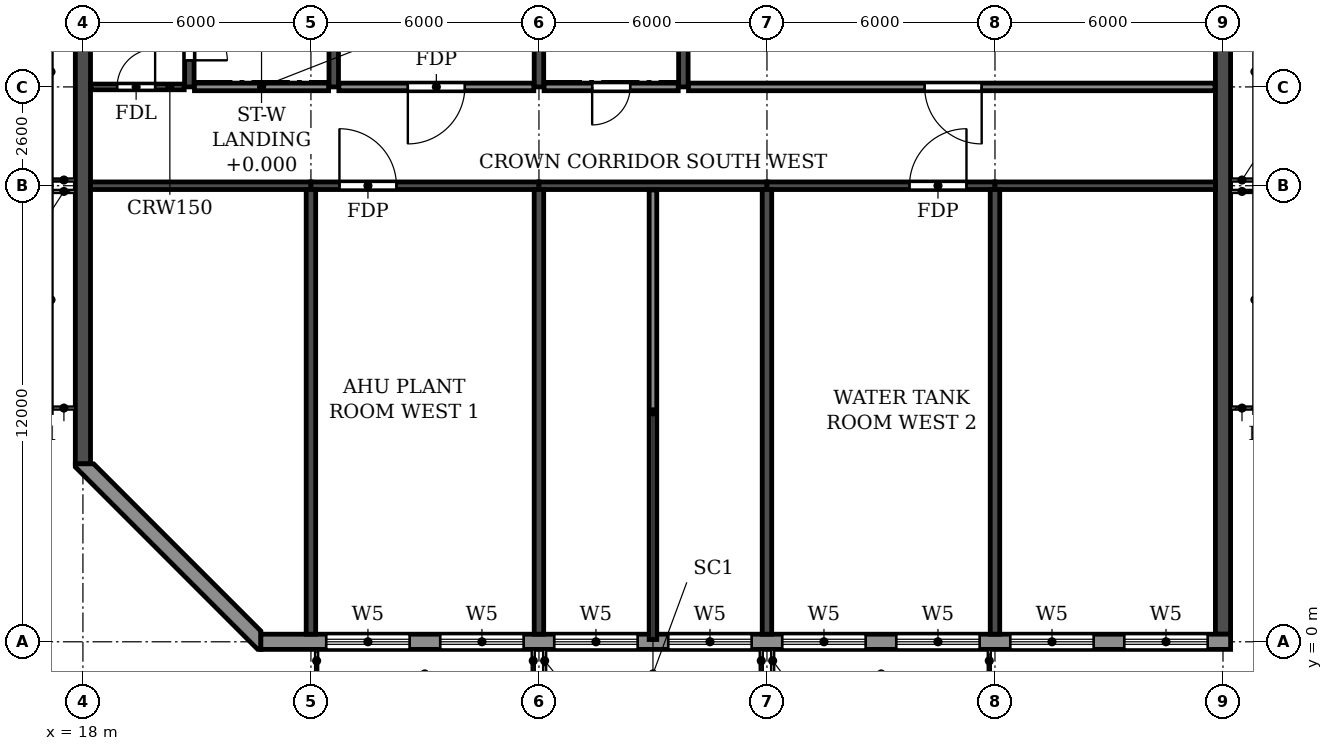
"""IFC4 building model, lengths in metres.
Left out: names, types, materials, properties, quantities, classifications, styles, units other than length and angle.
Written with IfcOpenShell. Run it as: python <this file> out.ifc"""

import sys

from ifc_helpers import new_model, si_unit, direction, frame, frame_2d, origin, place, context, subcontext, project, spatial, polyline, rectangle, outline, extrude, element, fill, save


model = new_model("IFC4")
c1 = context("Model", 3, precision=1e-05, world=origin(), true_north=direction((0.0, 1.0)))
c2 = subcontext(c1, "Body", "Model", "MODEL_VIEW")
j1 = project(units=[si_unit("LENGTHUNIT", "METRE"), si_unit("PLANEANGLEUNIT", "RADIAN")], contexts=[c1])
p1 = place(None, origin())
s1 = spatial("IfcSite", under=j1, at=p1, CompositionType="ELEMENT")
p2 = place(p1, origin())
s2 = spatial("IfcBuilding", under=s1, at=p2, CompositionType="ELEMENT")
p3 = place(p2, frame((0.0, 0.0, 275.7)))
s3 = spatial("IfcBuildingStorey", under=s2, at=p3, CompositionType="ELEMENT", Elevation=275.7)
for number, where, z_axis, x_axis in (
    (1, (24.0, 0.2, 0.0), (0.0, 0.0, 1.0), (0.0, 1.0, 0.0)),
    (2, (30.0, 0.2, 0.0), (0.0, 0.0, 1.0), (0.0, 1.0, 0.0)),
    (3, (36.0, 0.2, 0.0), (0.0, 0.0, 1.0), (0.0, 1.0, 0.0)),
    (4, (42.0, 0.2, 0.0), (0.0, 0.0, 1.0), (0.0, 1.0, 0.0)),
):
    element("IfcWall", number, at=place(p3, frame(where, z_axis=z_axis, x_axis=x_axis)), inside=s3, PredefinedType="SHEAR", context=c2, shape_type="SweptSolid", body=[
        extrude(rectangle(XDim=11.7, YDim=0.25, at=frame_2d((5.85, 0.0))), origin(), (0.0, 0.0, 1.0), 3.05),
    ])
p4 = place(p3, frame((18.0, 4.683, 0.0), z_axis=(0.0, 0.0, 1.0), x_axis=(0.0, 1.0, 0.0)))
e5 = element("IfcWall", 5, at=p4, inside=s3, PredefinedType="SHEAR", context=c2, shape_type="SweptSolid", body=[
    extrude(rectangle(XDim=31.834, YDim=0.4, at=frame_2d((15.917, 0.0))), origin(), (0.0, 0.0, 1.0), 3.05),
])
p5 = place(p3, frame((48.0, 0.2, 0.0), z_axis=(0.0, 0.0, 1.0), x_axis=(0.0, 1.0, 0.0)))
e6 = element("IfcWall", 6, at=p5, inside=s3, PredefinedType="SHEAR", context=c2, shape_type="SweptSolid", body=[
    extrude(rectangle(XDim=40.8, YDim=0.4, at=frame_2d((20.4, 0.0))), origin(), (0.0, 0.0, 1.0), 3.05),
])
p6 = place(p3, frame((18.2, 12.0, 0.0), z_axis=(0.0, 0.0, 1.0), x_axis=(1.0, 0.0, 0.0)))
e7 = element("IfcWall", 7, at=p6, inside=s3, PredefinedType="SHEAR", context=c2, shape_type="SweptSolid", body=[
    extrude(rectangle(XDim=5.8, YDim=0.2, at=frame_2d((2.9, 0.0))), origin(), (0.0, 0.0, 1.0), 2.45),
])
p7 = place(p3, frame((24.0, 12.0, 0.0), z_axis=(0.0, 0.0, 1.0), x_axis=(1.0, 0.0, 0.0)))
e8 = element("IfcWall", 8, at=p7, inside=s3, PredefinedType="SHEAR", context=c2, shape_type="SweptSolid", body=[
    extrude(rectangle(XDim=6.0, YDim=0.2, at=frame_2d((3.0, 0.0))), origin(), (0.0, 0.0, 1.0), 2.45),
])
p8 = place(p7, frame((0.75, 0.0, 0.0)))
e9 = element("IfcOpeningElement", 9, at=p8, cuts=e8, PredefinedType="OPENING", context=c2, shape_type="SweptSolid", body=[
    extrude(rectangle(XDim=1.5, YDim=2.1, at=frame_2d((0.75, 1.05))), frame((0.0, 0.11, 0.0), z_axis=(0.0, -1.0, 0.0), x_axis=(1.0, 0.0, 0.0)), (0.0, 0.0, 1.0), 0.22),
])
p9 = place(p3, frame((30.0, 12.0, 0.0), z_axis=(0.0, 0.0, 1.0), x_axis=(1.0, 0.0, 0.0)))
e10 = element("IfcWall", 10, at=p9, inside=s3, PredefinedType="SHEAR", context=c2, shape_type="SweptSolid", body=[
    extrude(rectangle(XDim=6.0, YDim=0.2, at=frame_2d((3.0, 0.0))), origin(), (0.0, 0.0, 1.0), 2.45),
])
p10 = place(p3, frame((36.0, 12.0, 0.0), z_axis=(0.0, 0.0, 1.0), x_axis=(1.0, 0.0, 0.0)))
e11 = element("IfcWall", 11, at=p10, inside=s3, PredefinedType="SHEAR", context=c2, shape_type="SweptSolid", body=[
    extrude(rectangle(XDim=6.0, YDim=0.2, at=frame_2d((3.0, 0.0))), origin(), (0.0, 0.0, 1.0), 2.45),
])
p11 = place(p10, frame((3.75, 0.0, 0.0)))
e12 = element("IfcOpeningElement", 12, at=p11, cuts=e11, PredefinedType="OPENING", context=c2, shape_type="SweptSolid", body=[
    extrude(rectangle(XDim=1.5, YDim=2.1, at=frame_2d((0.75, 1.05))), frame((0.0, 0.11, 0.0), z_axis=(0.0, -1.0, 0.0), x_axis=(1.0, 0.0, 0.0)), (0.0, 0.0, 1.0), 0.22),
])
p12 = place(p3, frame((42.0, 12.0, 0.0), z_axis=(0.0, 0.0, 1.0), x_axis=(1.0, 0.0, 0.0)))
e13 = element("IfcWall", 13, at=p12, inside=s3, PredefinedType="SHEAR", context=c2, shape_type="SweptSolid", body=[
    extrude(rectangle(XDim=5.8, YDim=0.2, at=frame_2d((2.9, 0.0))), origin(), (0.0, 0.0, 1.0), 2.45),
])
p13 = place(p3, frame((20.8, 14.6, 0.0), z_axis=(0.0, 0.0, 1.0), x_axis=(0.0, 1.0, 0.0)))
e14 = element("IfcWall", 14, at=p13, inside=s3, PredefinedType="SOLIDWALL", context=c2, shape_type="SweptSolid", body=[
    extrude(rectangle(XDim=7.875, YDim=0.25, at=frame_2d((3.938, 0.0))), origin(), (0.0, 0.0, 1.0), 3.05),
])
p14 = place(p13, frame((0.7, 0.0, 0.0)))
e15 = element("IfcOpeningElement", 15, at=p14, cuts=e14, PredefinedType="OPENING", context=c2, shape_type="SweptSolid", body=[
    extrude(rectangle(XDim=1.0, YDim=2.1, at=frame_2d((0.5, 1.05))), frame((0.0, 0.135, 0.0), z_axis=(0.0, -1.0, 0.0), x_axis=(1.0, 0.0, 0.0)), (0.0, 0.0, 1.0), 0.27),
])
for number, where, z_axis, x_axis in (
    (16, (24.6, 14.6, 0.0), (0.0, 0.0, 1.0), (0.0, 1.0, 0.0)),
    (17, (30.0, 14.6, 0.0), (0.0, 0.0, 1.0), (0.0, 1.0, 0.0)),
    (18, (33.8, 14.6, 0.0), (0.0, 0.0, 1.0), (0.0, 1.0, 0.0)),
):
    element("IfcWall", number, at=place(p3, frame(where, z_axis=z_axis, x_axis=x_axis)), inside=s3, PredefinedType="SOLIDWALL", context=c2, shape_type="SweptSolid", body=[
        extrude(rectangle(XDim=7.875, YDim=0.25, at=frame_2d((3.938, 0.0))), origin(), (0.0, 0.0, 1.0), 3.05),
    ])
p15 = place(p3, frame((22.683, 0.0, 0.0), z_axis=(0.0, 0.0, 1.0), x_axis=(1.0, 0.0, 0.0)))
e19 = element("IfcWall", 19, at=p15, inside=s3, PredefinedType="STANDARD", context=c2, shape_type="SweptSolid", body=[
    extrude(rectangle(XDim=25.517, YDim=0.4, at=frame_2d((12.759, 0.0))), origin(), (0.0, 0.0, 1.0), 3.05),
])
p16 = place(p15, frame((1.717, 0.0, 0.6)))
e20 = element("IfcOpeningElement", 20, at=p16, cuts=e19, PredefinedType="OPENING", context=c2, shape_type="SweptSolid", body=[
    extrude(rectangle(XDim=2.2, YDim=2.4, at=frame_2d((1.1, 1.2))), frame((0.0, 0.21, 0.0), z_axis=(0.0, -1.0, 0.0), x_axis=(1.0, 0.0, 0.0)), (0.0, 0.0, 1.0), 0.42),
])
p17 = place(p15, frame((4.717, 0.0, 0.6)))
e21 = element("IfcOpeningElement", 21, at=p17, cuts=e19, PredefinedType="OPENING", context=c2, shape_type="SweptSolid", body=[
    extrude(rectangle(XDim=2.2, YDim=2.4, at=frame_2d((1.1, 1.2))), frame((0.0, 0.21, 0.0), z_axis=(0.0, -1.0, 0.0), x_axis=(1.0, 0.0, 0.0)), (0.0, 0.0, 1.0), 0.42),
])
p18 = place(p15, frame((7.717, 0.0, 0.6)))
e22 = element("IfcOpeningElement", 22, at=p18, cuts=e19, PredefinedType="OPENING", context=c2, shape_type="SweptSolid", body=[
    extrude(rectangle(XDim=2.2, YDim=2.4, at=frame_2d((1.1, 1.2))), frame((0.0, 0.21, 0.0), z_axis=(0.0, -1.0, 0.0), x_axis=(1.0, 0.0, 0.0)), (0.0, 0.0, 1.0), 0.42),
])
p19 = place(p15, frame((10.717, 0.0, 0.6)))
e23 = element("IfcOpeningElement", 23, at=p19, cuts=e19, PredefinedType="OPENING", context=c2, shape_type="SweptSolid", body=[
    extrude(rectangle(XDim=2.2, YDim=2.4, at=frame_2d((1.1, 1.2))), frame((0.0, 0.21, 0.0), z_axis=(0.0, -1.0, 0.0), x_axis=(1.0, 0.0, 0.0)), (0.0, 0.0, 1.0), 0.42),
])
p20 = place(p15, frame((13.717, 0.0, 0.6)))
e24 = element("IfcOpeningElement", 24, at=p20, cuts=e19, PredefinedType="OPENING", context=c2, shape_type="SweptSolid", body=[
    extrude(rectangle(XDim=2.2, YDim=2.4, at=frame_2d((1.1, 1.2))), frame((0.0, 0.21, 0.0), z_axis=(0.0, -1.0, 0.0), x_axis=(1.0, 0.0, 0.0)), (0.0, 0.0, 1.0), 0.42),
])
p21 = place(p15, frame((16.717, 0.0, 0.6)))
e25 = element("IfcOpeningElement", 25, at=p21, cuts=e19, PredefinedType="OPENING", context=c2, shape_type="SweptSolid", body=[
    extrude(rectangle(XDim=2.2, YDim=2.4, at=frame_2d((1.1, 1.2))), frame((0.0, 0.21, 0.0), z_axis=(0.0, -1.0, 0.0), x_axis=(1.0, 0.0, 0.0)), (0.0, 0.0, 1.0), 0.42),
])
p22 = place(p15, frame((19.717, 0.0, 0.6)))
e26 = element("IfcOpeningElement", 26, at=p22, cuts=e19, PredefinedType="OPENING", context=c2, shape_type="SweptSolid", body=[
    extrude(rectangle(XDim=2.2, YDim=2.4, at=frame_2d((1.1, 1.2))), frame((0.0, 0.21, 0.0), z_axis=(0.0, -1.0, 0.0), x_axis=(1.0, 0.0, 0.0)), (0.0, 0.0, 1.0), 0.42),
])
p23 = place(p15, frame((22.717, 0.0, 0.6)))
e27 = element("IfcOpeningElement", 27, at=p23, cuts=e19, PredefinedType="OPENING", context=c2, shape_type="SweptSolid", body=[
    extrude(rectangle(XDim=2.2, YDim=2.4, at=frame_2d((1.1, 1.2))), frame((0.0, 0.21, 0.0), z_axis=(0.0, -1.0, 0.0), x_axis=(1.0, 0.0, 0.0)), (0.0, 0.0, 1.0), 0.42),
])
p24 = place(p3, origin())
e28 = element("IfcWall", 28, at=p24, inside=s3, PredefinedType="STANDARD", context=c2, shape_type="SweptSolid", body=[
    extrude(outline(polyline([(17.8, 4.683), (17.8, 4.6), (22.6, -0.2), (22.683, -0.2), (22.683, 0.283), (18.283, 4.683), (17.8, 4.683)])), origin(), (0.0, 0.0, 1.0), 3.05),
])
p25 = place(p3, frame((18.21, 14.6, 0.0), z_axis=(0.0, 0.0, 1.0), x_axis=(1.0, 0.0, 0.0)))
e29 = element("IfcWall", 29, at=p25, inside=s3, PredefinedType="PARTITIONING", context=c2, shape_type="SweptSolid", body=[
    extrude(rectangle(XDim=2.455, YDim=0.15, at=frame_2d((1.228, 0.0))), origin(), (0.0, 0.0, 1.0), 3.05),
])
p26 = place(p25, frame((0.69, 0.0, 0.0)))
e30 = element("IfcOpeningElement", 30, at=p26, cuts=e29, PredefinedType="OPENING", context=c2, shape_type="SweptSolid", body=[
    extrude(rectangle(XDim=1.0, YDim=2.1, at=frame_2d((0.5, 1.05))), frame((0.0, 0.085, 0.0), z_axis=(0.0, -1.0, 0.0), x_axis=(1.0, 0.0, 0.0)), (0.0, 0.0, 1.0), 0.17),
])
p27 = place(p3, frame((24.735, 14.6, 0.0), z_axis=(0.0, 0.0, 1.0), x_axis=(1.0, 0.0, 0.0)))
e31 = element("IfcWall", 31, at=p27, inside=s3, PredefinedType="PARTITIONING", context=c2, shape_type="SweptSolid", body=[
    extrude(rectangle(XDim=5.13, YDim=0.2, at=frame_2d((2.565, 0.0))), origin(), (0.0, 0.0, 1.0), 3.05),
])
p28 = place(p27, frame((1.815, 0.0, 0.0)))
e32 = element("IfcOpeningElement", 32, at=p28, cuts=e31, PredefinedType="OPENING", context=c2, shape_type="SweptSolid", body=[
    extrude(rectangle(XDim=1.5, YDim=2.1, at=frame_2d((0.75, 1.05))), frame((0.0, 0.11, 0.0), z_axis=(0.0, -1.0, 0.0), x_axis=(1.0, 0.0, 0.0)), (0.0, 0.0, 1.0), 0.22),
])
p29 = place(p3, frame((33.935, 14.6, 0.0), z_axis=(0.0, 0.0, 1.0), x_axis=(1.0, 0.0, 0.0)))
e33 = element("IfcWall", 33, at=p29, inside=s3, PredefinedType="PARTITIONING", context=c2, shape_type="SweptSolid", body=[
    extrude(rectangle(XDim=13.855, YDim=0.2, at=frame_2d((6.927, 0.0))), origin(), (0.0, 0.0, 1.0), 3.05),
])
p30 = place(p29, frame((6.215, 0.0, 0.0)))
e34 = element("IfcOpeningElement", 34, at=p30, cuts=e33, PredefinedType="OPENING", context=c2, shape_type="SweptSolid", body=[
    extrude(rectangle(XDim=1.5, YDim=2.1, at=frame_2d((0.75, 1.05))), frame((0.0, 0.11, 0.0), z_axis=(0.0, -1.0, 0.0), x_axis=(1.0, 0.0, 0.0)), (0.0, 0.0, 1.0), 0.22),
])
p31 = place(p3, frame((33.0, 0.06, 0.0), z_axis=(0.0, 0.0, 1.0), x_axis=(0.0, 1.0, 0.0)))
e35 = element("IfcWall", 35, at=p31, inside=s3, PredefinedType="PARTITIONING", context=c2, shape_type="SweptSolid", body=[
    extrude(rectangle(XDim=11.83, YDim=0.2, at=frame_2d((5.915, 0.0))), origin(), (0.0, 0.0, 1.0), 3.05),
])
p32 = place(p3, frame((20.935, 14.6, 0.0), z_axis=(0.0, 0.0, 1.0), x_axis=(1.0, 0.0, 0.0)))
e36 = element("IfcWall", 36, at=p32, inside=s3, PredefinedType="PARTITIONING", context=c2, shape_type="SweptSolid", body=[
    extrude(rectangle(XDim=3.53, YDim=0.2, at=frame_2d((1.765, 0.0))), origin(), (0.0, 0.0, 1.0), 3.05),
])
p33 = place(p3, frame((30.135, 14.6, 0.0), z_axis=(0.0, 0.0, 1.0), x_axis=(1.0, 0.0, 0.0)))
e37 = element("IfcWall", 37, at=p33, inside=s3, PredefinedType="PARTITIONING", context=c2, shape_type="SweptSolid", body=[
    extrude(rectangle(XDim=3.53, YDim=0.2, at=frame_2d((1.765, 0.0))), origin(), (0.0, 0.0, 1.0), 3.05),
])
p34 = place(p33, frame((1.265, 0.0, 0.0)))
e38 = element("IfcOpeningElement", 38, at=p34, cuts=e37, PredefinedType="OPENING", context=c2, shape_type="SweptSolid", body=[
    extrude(rectangle(XDim=1.0, YDim=2.1, at=frame_2d((0.5, 1.05))), frame((0.0, 0.11, 0.0), z_axis=(0.0, -1.0, 0.0), x_axis=(1.0, 0.0, 0.0)), (0.0, 0.0, 1.0), 0.22),
])
p35 = place(p16, origin())
e39 = element("IfcWindow", 39, at=p35, inside=s3, PartitioningType="TRIPLE_PANEL_HORIZONTAL", PredefinedType="WINDOW", context=c2, shape_type="SweptSolid", body=[
    extrude(rectangle(XDim=2.2, YDim=2.4, at=frame_2d((1.1, 1.2))), frame((0.0, 0.03, 0.0), z_axis=(0.0, -1.0, 0.0), x_axis=(1.0, 0.0, 0.0)), (0.0, 0.0, 1.0), 0.06),
])
fill(e20, e39)
p36 = place(p17, origin())
e40 = element("IfcWindow", 40, at=p36, inside=s3, PartitioningType="TRIPLE_PANEL_HORIZONTAL", PredefinedType="WINDOW", context=c2, shape_type="SweptSolid", body=[
    extrude(rectangle(XDim=2.2, YDim=2.4, at=frame_2d((1.1, 1.2))), frame((0.0, 0.03, 0.0), z_axis=(0.0, -1.0, 0.0), x_axis=(1.0, 0.0, 0.0)), (0.0, 0.0, 1.0), 0.06),
])
fill(e21, e40)
p37 = place(p18, origin())
e41 = element("IfcWindow", 41, at=p37, inside=s3, PartitioningType="TRIPLE_PANEL_HORIZONTAL", PredefinedType="WINDOW", context=c2, shape_type="SweptSolid", body=[
    extrude(rectangle(XDim=2.2, YDim=2.4, at=frame_2d((1.1, 1.2))), frame((0.0, 0.03, 0.0), z_axis=(0.0, -1.0, 0.0), x_axis=(1.0, 0.0, 0.0)), (0.0, 0.0, 1.0), 0.06),
])
fill(e22, e41)
p38 = place(p19, origin())
e42 = element("IfcWindow", 42, at=p38, inside=s3, PartitioningType="TRIPLE_PANEL_HORIZONTAL", PredefinedType="WINDOW", context=c2, shape_type="SweptSolid", body=[
    extrude(rectangle(XDim=2.2, YDim=2.4, at=frame_2d((1.1, 1.2))), frame((0.0, 0.03, 0.0), z_axis=(0.0, -1.0, 0.0), x_axis=(1.0, 0.0, 0.0)), (0.0, 0.0, 1.0), 0.06),
])
fill(e23, e42)
p39 = place(p20, origin())
e43 = element("IfcWindow", 43, at=p39, inside=s3, PartitioningType="TRIPLE_PANEL_HORIZONTAL", PredefinedType="WINDOW", context=c2, shape_type="SweptSolid", body=[
    extrude(rectangle(XDim=2.2, YDim=2.4, at=frame_2d((1.1, 1.2))), frame((0.0, 0.03, 0.0), z_axis=(0.0, -1.0, 0.0), x_axis=(1.0, 0.0, 0.0)), (0.0, 0.0, 1.0), 0.06),
])
fill(e24, e43)
p40 = place(p21, origin())
e44 = element("IfcWindow", 44, at=p40, inside=s3, PartitioningType="TRIPLE_PANEL_HORIZONTAL", PredefinedType="WINDOW", context=c2, shape_type="SweptSolid", body=[
    extrude(rectangle(XDim=2.2, YDim=2.4, at=frame_2d((1.1, 1.2))), frame((0.0, 0.03, 0.0), z_axis=(0.0, -1.0, 0.0), x_axis=(1.0, 0.0, 0.0)), (0.0, 0.0, 1.0), 0.06),
])
fill(e25, e44)
p41 = place(p22, origin())
e45 = element("IfcWindow", 45, at=p41, inside=s3, PartitioningType="TRIPLE_PANEL_HORIZONTAL", PredefinedType="WINDOW", context=c2, shape_type="SweptSolid", body=[
    extrude(rectangle(XDim=2.2, YDim=2.4, at=frame_2d((1.1, 1.2))), frame((0.0, 0.03, 0.0), z_axis=(0.0, -1.0, 0.0), x_axis=(1.0, 0.0, 0.0)), (0.0, 0.0, 1.0), 0.06),
])
fill(e26, e45)
p42 = place(p23, origin())
e46 = element("IfcWindow", 46, at=p42, inside=s3, PartitioningType="TRIPLE_PANEL_HORIZONTAL", PredefinedType="WINDOW", context=c2, shape_type="SweptSolid", body=[
    extrude(rectangle(XDim=2.2, YDim=2.4, at=frame_2d((1.1, 1.2))), frame((0.0, 0.03, 0.0), z_axis=(0.0, -1.0, 0.0), x_axis=(1.0, 0.0, 0.0)), (0.0, 0.0, 1.0), 0.06),
])
fill(e27, e46)
p43 = place(p8, origin())
e47 = element("IfcDoor", 47, at=p43, inside=s3, OperationType="DOUBLE_DOOR_SINGLE_SWING", PredefinedType="DOOR", context=c2, shape_type="SweptSolid", body=[
    extrude(rectangle(XDim=1.5, YDim=2.1, at=frame_2d((0.75, 1.05))), frame((0.0, 0.025, 0.0), z_axis=(0.0, -1.0, 0.0), x_axis=(1.0, 0.0, 0.0)), (0.0, 0.0, 1.0), 0.05),
])
fill(e9, e47)
p44 = place(p28, frame((1.5, 0.0, 0.0), z_axis=(0.0, 0.0, 1.0), x_axis=(-1.0, 0.0, 0.0)))
e48 = element("IfcDoor", 48, at=p44, inside=s3, OperationType="DOUBLE_DOOR_SINGLE_SWING", PredefinedType="DOOR", context=c2, shape_type="SweptSolid", body=[
    extrude(rectangle(XDim=1.5, YDim=2.1, at=frame_2d((0.75, 1.05))), frame((0.0, 0.025, 0.0), z_axis=(0.0, -1.0, 0.0), x_axis=(1.0, 0.0, 0.0)), (0.0, 0.0, 1.0), 0.05),
])
fill(e32, e48)
p45 = place(p11, origin())
e49 = element("IfcDoor", 49, at=p45, inside=s3, OperationType="DOUBLE_DOOR_SINGLE_SWING", PredefinedType="DOOR", context=c2, shape_type="SweptSolid", body=[
    extrude(rectangle(XDim=1.5, YDim=2.1, at=frame_2d((0.75, 1.05))), frame((0.0, 0.025, 0.0), z_axis=(0.0, -1.0, 0.0), x_axis=(1.0, 0.0, 0.0)), (0.0, 0.0, 1.0), 0.05),
])
fill(e12, e49)
p46 = place(p30, frame((1.5, 0.0, 0.0), z_axis=(0.0, 0.0, 1.0), x_axis=(-1.0, 0.0, 0.0)))
e50 = element("IfcDoor", 50, at=p46, inside=s3, OperationType="DOUBLE_DOOR_SINGLE_SWING", PredefinedType="DOOR", context=c2, shape_type="SweptSolid", body=[
    extrude(rectangle(XDim=1.5, YDim=2.1, at=frame_2d((0.75, 1.05))), frame((0.0, 0.025, 0.0), z_axis=(0.0, -1.0, 0.0), x_axis=(1.0, 0.0, 0.0)), (0.0, 0.0, 1.0), 0.05),
])
fill(e34, e50)
p47 = place(p26, origin())
e51 = element("IfcDoor", 51, at=p47, inside=s3, OperationType="SINGLE_SWING_RIGHT", PredefinedType="DOOR", context=c2, shape_type="SweptSolid", body=[
    extrude(rectangle(XDim=1.0, YDim=2.1, at=frame_2d((0.5, 1.05))), frame((0.0, 0.025, 0.0), z_axis=(0.0, -1.0, 0.0), x_axis=(1.0, 0.0, 0.0)), (0.0, 0.0, 1.0), 0.05),
])
fill(e30, e51)
p48 = place(p14, frame((1.0, 0.0, 0.0), z_axis=(0.0, 0.0, 1.0), x_axis=(-1.0, 0.0, 0.0)))
e52 = element("IfcDoor", 52, at=p48, inside=s3, OperationType="SINGLE_SWING_RIGHT", PredefinedType="DOOR", context=c2, shape_type="SweptSolid", body=[
    extrude(rectangle(XDim=1.0, YDim=2.1, at=frame_2d((0.5, 1.05))), frame((0.0, 0.025, 0.0), z_axis=(0.0, -1.0, 0.0), x_axis=(1.0, 0.0, 0.0)), (0.0, 0.0, 1.0), 0.05),
])
fill(e15, e52)
p49 = place(p34, frame((1.0, 0.0, 0.0), z_axis=(0.0, 0.0, 1.0), x_axis=(-1.0, 0.0, 0.0)))
e53 = element("IfcDoor", 53, at=p49, inside=s3, OperationType="SINGLE_SWING_RIGHT", PredefinedType="DOOR", context=c2, shape_type="SweptSolid", body=[
    extrude(rectangle(XDim=1.0, YDim=2.1, at=frame_2d((0.5, 1.05))), frame((0.0, 0.025, 0.0), z_axis=(0.0, -1.0, 0.0), x_axis=(1.0, 0.0, 0.0)), (0.0, 0.0, 1.0), 0.05),
])
fill(e38, e53)
save(model, sys.argv[1])
